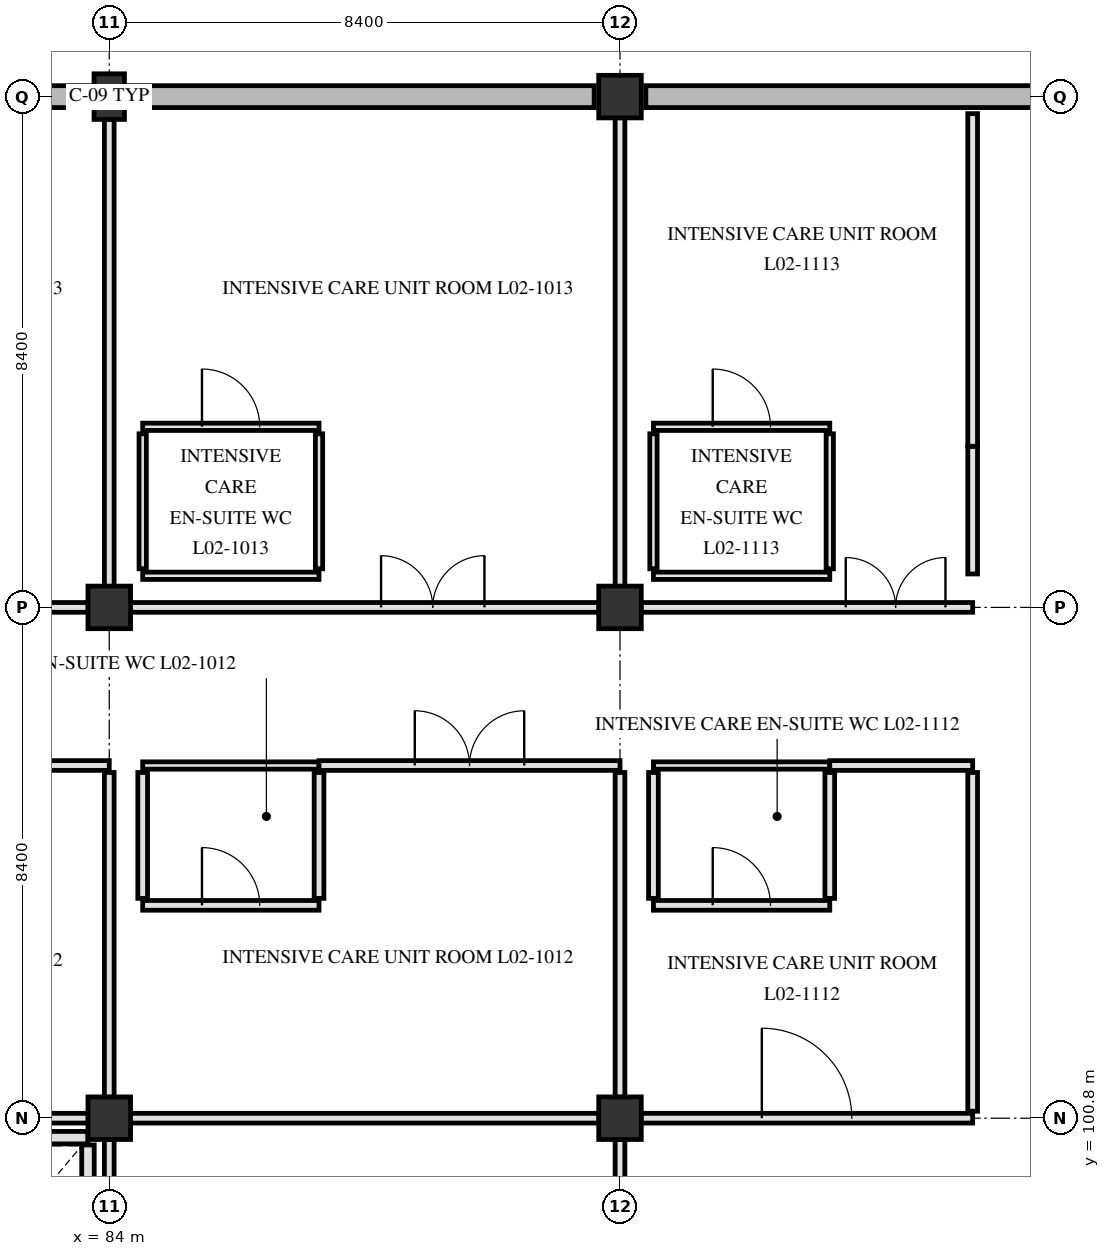
"""IFC4 building model, lengths in metres.
Left out: names, types, materials, properties, quantities, classifications, styles, units other than length and angle.
Written with IfcOpenShell. Run it as: python <this file> out.ifc"""

import sys

from ifc_helpers import new_model, si_unit, direction, frame, frame_2d, origin, origin_2d, place, context, subcontext, project, spatial, rectangle, extrude, element, fill, save


model = new_model("IFC4")
c1 = context("Model", 3, precision=1e-05, world=origin(), true_north=direction((0.0, 1.0)))
c2 = subcontext(c1, "Body", "Model", "MODEL_VIEW")
j1 = project(units=[si_unit("LENGTHUNIT", "METRE"), si_unit("PLANEANGLEUNIT", "RADIAN")], contexts=[c1])
p1 = place(None, origin())
s1 = spatial("IfcSite", under=j1, at=p1, CompositionType="ELEMENT")
p2 = place(p1, origin())
s2 = spatial("IfcBuilding", under=s1, at=p2, CompositionType="ELEMENT")
p3 = place(p2, frame((0.0, 0.0, 9.3)))
s3 = spatial("IfcBuildingStorey", under=s2, at=p3, CompositionType="ELEMENT", Elevation=9.3)
for number, where, z_axis, x_axis in (
    (1, (84.0, 100.8, 0.0), (0.0, 0.0, 1.0), (1.0, 0.0, 0.0)),
    (2, (84.0, 109.2, 0.0), (0.0, 0.0, 1.0), (1.0, 0.0, 0.0)),
):
    element("IfcColumn", number, at=place(p3, frame(where, z_axis=z_axis, x_axis=x_axis)), inside=s3, PredefinedType="COLUMN", context=c2, shape_type="SweptSolid", body=[
        extrude(rectangle(XDim=0.7, YDim=0.7, at=origin_2d()), origin(), (0.0, 0.0, 1.0), 5.1),
    ])
p4 = place(p3, frame((84.0, 117.6, 0.0), z_axis=(0.0, 0.0, 1.0), x_axis=(1.0, 0.0, 0.0)))
e3 = element("IfcColumn", 3, at=p4, inside=s3, PredefinedType="PILASTER", context=c2, shape_type="SweptSolid", body=[
    extrude(rectangle(XDim=0.5, YDim=0.75, at=origin_2d()), origin(), (0.0, 0.0, 1.0), 5.1),
])
for number, where, z_axis, x_axis in (
    (4, (92.4, 100.8, 0.0), (0.0, 0.0, 1.0), (1.0, 0.0, 0.0)),
    (5, (92.4, 109.2, 0.0), (0.0, 0.0, 1.0), (1.0, 0.0, 0.0)),
    (6, (92.4, 117.6, 0.0), (0.0, 0.0, 1.0), (1.0, 0.0, 0.0)),
):
    element("IfcColumn", number, at=place(p3, frame(where, z_axis=z_axis, x_axis=x_axis)), inside=s3, PredefinedType="COLUMN", context=c2, shape_type="SweptSolid", body=[
        extrude(rectangle(XDim=0.7, YDim=0.7, at=origin_2d()), origin(), (0.0, 0.0, 1.0), 5.1),
    ])
for number, where, z_axis, x_axis in (
    (7, (76.025, 117.6, 0.0), (0.0, 0.0, 1.0), (1.0, 0.0, 0.0)),
    (8, (84.325, 117.6, 0.0), (0.0, 0.0, 1.0), (1.0, 0.0, 0.0)),
):
    element("IfcWall", number, at=place(p3, frame(where, z_axis=z_axis, x_axis=x_axis)), inside=s3, PredefinedType="SOLIDWALL", context=c2, shape_type="SweptSolid", body=[
        extrude(rectangle(XDim=7.65, YDim=0.36, at=frame_2d((3.825, 0.0))), origin(), (0.0, 0.0, 1.0), 4.78),
    ])
p5 = place(p3, frame((92.825, 117.6, 0.0), z_axis=(0.0, 0.0, 1.0), x_axis=(1.0, 0.0, 0.0)))
e9 = element("IfcWall", 9, at=p5, inside=s3, PredefinedType="SOLIDWALL", context=c2, shape_type="SweptSolid", body=[
    extrude(rectangle(XDim=7.55, YDim=0.36, at=frame_2d((3.775, 0.0))), origin(), (0.0, 0.0, 1.0), 4.78),
])
p6 = place(p3, frame((83.65, 96.24, 0.0), z_axis=(0.0, 0.0, 1.0), x_axis=(0.0, 1.0, 0.0)))
e10 = element("IfcWall", 10, at=p6, inside=s3, PredefinedType="PARTITIONING", context=c2, shape_type="SweptSolid", body=[
    extrude(rectangle(XDim=4.12, YDim=0.205, at=frame_2d((2.06, 0.0))), origin(), (0.0, 0.0, 1.0), 4.77),
])
p7 = place(p3, frame((80.08, 100.48, 0.0), z_axis=(0.0, 0.0, 1.0), x_axis=(1.0, 0.0, 0.0)))
e11 = element("IfcWall", 11, at=p7, inside=s3, PredefinedType="PARTITIONING", context=c2, shape_type="SweptSolid", body=[
    extrude(rectangle(XDim=3.57, YDim=0.205, at=frame_2d((1.785, 0.0))), origin(), (0.0, 0.0, 1.0), 4.17),
])
p8 = place(p3, frame((78.95, 100.8, 0.0), z_axis=(0.0, 0.0, 1.0), x_axis=(1.0, 0.0, 0.0)))
e12 = element("IfcWall", 12, at=p8, inside=s3, PredefinedType="PARTITIONING", context=c2, shape_type="SweptSolid", body=[
    extrude(rectangle(XDim=4.705, YDim=0.16, at=frame_2d((2.353, 0.0))), origin(), (0.0, 0.0, 1.0), 4.17),
])
p9 = place(p3, frame((84.345, 100.8, 0.0), z_axis=(0.0, 0.0, 1.0), x_axis=(1.0, 0.0, 0.0)))
e13 = element("IfcWall", 13, at=p9, inside=s3, PredefinedType="PARTITIONING", context=c2, shape_type="SweptSolid", body=[
    extrude(rectangle(XDim=7.71, YDim=0.16, at=frame_2d((3.855, 0.0))), origin(), (0.0, 0.0, 1.0), 4.17),
])
p10 = place(p3, frame((92.745, 100.8, 0.0), z_axis=(0.0, 0.0, 1.0), x_axis=(1.0, 0.0, 0.0)))
e14 = element("IfcWall", 14, at=p10, inside=s3, PredefinedType="PARTITIONING", context=c2, shape_type="SweptSolid", body=[
    extrude(rectangle(XDim=5.455, YDim=0.16, at=frame_2d((2.728, 0.0))), origin(), (0.0, 0.0, 1.0), 4.17),
])
p11 = place(p10, frame((1.988, 0.0, 0.0)))
e15 = element("IfcOpeningElement", 15, at=p11, cuts=e14, PredefinedType="OPENING", context=c2, shape_type="SweptSolid", body=[
    extrude(rectangle(XDim=1.48, YDim=2.22, at=frame_2d((0.74, 1.11))), frame((0.0, 0.09, 0.0), z_axis=(0.0, -1.0, 0.0), x_axis=(1.0, 0.0, 0.0)), (0.0, 0.0, 1.0), 0.18),
])
p12 = place(p3, frame((84.55, 104.3, 0.0), z_axis=(0.0, 0.0, 1.0), x_axis=(1.0, 0.0, 0.0)))
e16 = element("IfcWall", 16, at=p12, inside=s3, PredefinedType="PARTITIONING", context=c2, shape_type="SweptSolid", body=[
    extrude(rectangle(XDim=2.9, YDim=0.16, at=frame_2d((1.45, 0.0))), origin(), (0.0, 0.0, 1.0), 4.77),
])
p13 = place(p12, frame((0.975, 0.0, 0.0)))
e17 = element("IfcOpeningElement", 17, at=p13, cuts=e16, PredefinedType="OPENING", context=c2, shape_type="SweptSolid", body=[
    extrude(rectangle(XDim=0.95, YDim=2.1, at=frame_2d((0.475, 1.05))), frame((0.0, 0.09, 0.0), z_axis=(0.0, -1.0, 0.0), x_axis=(1.0, 0.0, 0.0)), (0.0, 0.0, 1.0), 0.18),
])
p14 = place(p3, frame((92.95, 104.3, 0.0), z_axis=(0.0, 0.0, 1.0), x_axis=(1.0, 0.0, 0.0)))
e18 = element("IfcWall", 18, at=p14, inside=s3, PredefinedType="PARTITIONING", context=c2, shape_type="SweptSolid", body=[
    extrude(rectangle(XDim=2.9, YDim=0.16, at=frame_2d((1.45, 0.0))), origin(), (0.0, 0.0, 1.0), 4.77),
])
p15 = place(p14, frame((0.975, 0.0, 0.0)))
e19 = element("IfcOpeningElement", 19, at=p15, cuts=e18, PredefinedType="OPENING", context=c2, shape_type="SweptSolid", body=[
    extrude(rectangle(XDim=0.95, YDim=2.1, at=frame_2d((0.475, 1.05))), frame((0.0, 0.09, 0.0), z_axis=(0.0, -1.0, 0.0), x_axis=(1.0, 0.0, 0.0)), (0.0, 0.0, 1.0), 0.18),
])
p16 = place(p3, frame((79.05, 106.6, 0.0), z_axis=(0.0, 0.0, 1.0), x_axis=(1.0, 0.0, 0.0)))
e20 = element("IfcWall", 20, at=p16, inside=s3, PredefinedType="PARTITIONING", context=c2, shape_type="SweptSolid", body=[
    extrude(rectangle(XDim=4.95, YDim=0.16, at=frame_2d((2.475, 0.0))), origin(), (0.0, 0.0, 1.0), 4.17),
])
p17 = place(p16, frame((1.985, 0.0, 0.0)))
e21 = element("IfcOpeningElement", 21, at=p17, cuts=e20, PredefinedType="OPENING", context=c2, shape_type="SweptSolid", body=[
    extrude(rectangle(XDim=0.98, YDim=2.12, at=frame_2d((0.49, 1.06))), frame((0.0, 0.09, 0.0), z_axis=(0.0, -1.0, 0.0), x_axis=(1.0, 0.0, 0.0)), (0.0, 0.0, 1.0), 0.18),
])
p18 = place(p3, frame((84.55, 106.6, 0.0), z_axis=(0.0, 0.0, 1.0), x_axis=(1.0, 0.0, 0.0)))
e22 = element("IfcWall", 22, at=p18, inside=s3, PredefinedType="PARTITIONING", context=c2, shape_type="SweptSolid", body=[
    extrude(rectangle(XDim=2.9, YDim=0.12, at=frame_2d((1.45, 0.0))), origin(), (0.0, 0.0, 1.0), 4.77),
])
p19 = place(p3, frame((87.45, 106.6, 0.0), z_axis=(0.0, 0.0, 1.0), x_axis=(1.0, 0.0, 0.0)))
e23 = element("IfcWall", 23, at=p19, inside=s3, PredefinedType="PARTITIONING", context=c2, shape_type="SweptSolid", body=[
    extrude(rectangle(XDim=4.95, YDim=0.16, at=frame_2d((2.475, 0.0))), origin(), (0.0, 0.0, 1.0), 4.17),
])
p20 = place(p19, frame((1.575, 0.0, 0.0)))
e24 = element("IfcOpeningElement", 24, at=p20, cuts=e23, PredefinedType="OPENING", context=c2, shape_type="SweptSolid", body=[
    extrude(rectangle(XDim=1.8, YDim=2.25, at=frame_2d((0.9, 1.125))), frame((0.0, 0.09, 0.0), z_axis=(0.0, -1.0, 0.0), x_axis=(1.0, 0.0, 0.0)), (0.0, 0.0, 1.0), 0.18),
])
p21 = place(p3, frame((92.95, 106.6, 0.0), z_axis=(0.0, 0.0, 1.0), x_axis=(1.0, 0.0, 0.0)))
e25 = element("IfcWall", 25, at=p21, inside=s3, PredefinedType="PARTITIONING", context=c2, shape_type="SweptSolid", body=[
    extrude(rectangle(XDim=2.9, YDim=0.12, at=frame_2d((1.45, 0.0))), origin(), (0.0, 0.0, 1.0), 4.77),
])
p22 = place(p3, frame((95.85, 106.6, 0.0), z_axis=(0.0, 0.0, 1.0), x_axis=(1.0, 0.0, 0.0)))
e26 = element("IfcWall", 26, at=p22, inside=s3, PredefinedType="PARTITIONING", context=c2, shape_type="SweptSolid", body=[
    extrude(rectangle(XDim=2.35, YDim=0.16, at=frame_2d((1.175, 0.0))), origin(), (0.0, 0.0, 1.0), 4.77),
])
p23 = place(p3, frame((75.945, 109.2, 0.0), z_axis=(0.0, 0.0, 1.0), x_axis=(1.0, 0.0, 0.0)))
e27 = element("IfcWall", 27, at=p23, inside=s3, PredefinedType="PARTITIONING", context=c2, shape_type="SweptSolid", body=[
    extrude(rectangle(XDim=7.71, YDim=0.16, at=frame_2d((3.855, 0.0))), origin(), (0.0, 0.0, 1.0), 4.17),
])
p24 = place(p23, frame((3.265, 0.0, 0.0)))
e28 = element("IfcOpeningElement", 28, at=p24, cuts=e27, PredefinedType="OPENING", context=c2, shape_type="SweptSolid", body=[
    extrude(rectangle(XDim=1.18, YDim=2.18, at=frame_2d((0.59, 1.09))), frame((0.0, 0.09, 0.0), z_axis=(0.0, -1.0, 0.0), x_axis=(1.0, 0.0, 0.0)), (0.0, 0.0, 1.0), 0.18),
])
p25 = place(p3, frame((84.345, 109.2, 0.0), z_axis=(0.0, 0.0, 1.0), x_axis=(1.0, 0.0, 0.0)))
e29 = element("IfcWall", 29, at=p25, inside=s3, PredefinedType="PARTITIONING", context=c2, shape_type="SweptSolid", body=[
    extrude(rectangle(XDim=7.71, YDim=0.16, at=frame_2d((3.855, 0.0))), origin(), (0.0, 0.0, 1.0), 4.17),
])
p26 = place(p25, frame((4.125, 0.0, 0.0)))
e30 = element("IfcOpeningElement", 30, at=p26, cuts=e29, PredefinedType="OPENING", context=c2, shape_type="SweptSolid", body=[
    extrude(rectangle(XDim=1.7, YDim=2.25, at=frame_2d((0.85, 1.125))), frame((0.0, 0.09, 0.0), z_axis=(0.0, -1.0, 0.0), x_axis=(1.0, 0.0, 0.0)), (0.0, 0.0, 1.0), 0.18),
])
p27 = place(p3, frame((92.745, 109.2, 0.0), z_axis=(0.0, 0.0, 1.0), x_axis=(1.0, 0.0, 0.0)))
e31 = element("IfcWall", 31, at=p27, inside=s3, PredefinedType="PARTITIONING", context=c2, shape_type="SweptSolid", body=[
    extrude(rectangle(XDim=5.455, YDim=0.16, at=frame_2d((2.728, 0.0))), origin(), (0.0, 0.0, 1.0), 4.17),
])
p28 = place(p27, frame((3.368, 0.0, 0.0)))
e32 = element("IfcOpeningElement", 32, at=p28, cuts=e31, PredefinedType="OPENING", context=c2, shape_type="SweptSolid", body=[
    extrude(rectangle(XDim=1.64, YDim=2.28, at=frame_2d((0.82, 1.14))), frame((0.0, 0.09, 0.0), z_axis=(0.0, -1.0, 0.0), x_axis=(1.0, 0.0, 0.0)), (0.0, 0.0, 1.0), 0.18),
])
p29 = place(p3, frame((84.55, 109.72, 0.0), z_axis=(0.0, 0.0, 1.0), x_axis=(1.0, 0.0, 0.0)))
e33 = element("IfcWall", 33, at=p29, inside=s3, PredefinedType="PARTITIONING", context=c2, shape_type="SweptSolid", body=[
    extrude(rectangle(XDim=2.9, YDim=0.12, at=frame_2d((1.45, 0.0))), origin(), (0.0, 0.0, 1.0), 4.77),
])
p30 = place(p3, frame((92.95, 109.72, 0.0), z_axis=(0.0, 0.0, 1.0), x_axis=(1.0, 0.0, 0.0)))
e34 = element("IfcWall", 34, at=p30, inside=s3, PredefinedType="PARTITIONING", context=c2, shape_type="SweptSolid", body=[
    extrude(rectangle(XDim=2.9, YDim=0.12, at=frame_2d((1.45, 0.0))), origin(), (0.0, 0.0, 1.0), 4.77),
])
p31 = place(p3, frame((84.55, 112.17, 0.0), z_axis=(0.0, 0.0, 1.0), x_axis=(1.0, 0.0, 0.0)))
e35 = element("IfcWall", 35, at=p31, inside=s3, PredefinedType="PARTITIONING", context=c2, shape_type="SweptSolid", body=[
    extrude(rectangle(XDim=2.9, YDim=0.12, at=frame_2d((1.45, 0.0))), origin(), (0.0, 0.0, 1.0), 4.77),
])
p32 = place(p31, frame((0.975, 0.0, 0.0)))
e36 = element("IfcOpeningElement", 36, at=p32, cuts=e35, PredefinedType="OPENING", context=c2, shape_type="SweptSolid", body=[
    extrude(rectangle(XDim=0.95, YDim=2.1, at=frame_2d((0.475, 1.05))), frame((0.0, 0.07, 0.0), z_axis=(0.0, -1.0, 0.0), x_axis=(1.0, 0.0, 0.0)), (0.0, 0.0, 1.0), 0.14),
])
p33 = place(p3, frame((92.95, 112.17, 0.0), z_axis=(0.0, 0.0, 1.0), x_axis=(1.0, 0.0, 0.0)))
e37 = element("IfcWall", 37, at=p33, inside=s3, PredefinedType="PARTITIONING", context=c2, shape_type="SweptSolid", body=[
    extrude(rectangle(XDim=2.9, YDim=0.12, at=frame_2d((1.45, 0.0))), origin(), (0.0, 0.0, 1.0), 4.77),
])
p34 = place(p33, frame((0.975, 0.0, 0.0)))
e38 = element("IfcOpeningElement", 38, at=p34, cuts=e37, PredefinedType="OPENING", context=c2, shape_type="SweptSolid", body=[
    extrude(rectangle(XDim=0.95, YDim=2.1, at=frame_2d((0.475, 1.05))), frame((0.0, 0.07, 0.0), z_axis=(0.0, -1.0, 0.0), x_axis=(1.0, 0.0, 0.0)), (0.0, 0.0, 1.0), 0.14),
])
p35 = place(p3, frame((84.0, 96.1, 0.0), z_axis=(0.0, 0.0, 1.0), x_axis=(0.0, 1.0, 0.0)))
e39 = element("IfcWall", 39, at=p35, inside=s3, PredefinedType="PARTITIONING", context=c2, shape_type="SweptSolid", body=[
    extrude(rectangle(XDim=4.355, YDim=0.16, at=frame_2d((2.177, 0.0))), origin(), (0.0, 0.0, 1.0), 4.17),
])
p36 = place(p3, frame((84.0, 101.145, 0.0), z_axis=(0.0, 0.0, 1.0), x_axis=(0.0, 1.0, 0.0)))
e40 = element("IfcWall", 40, at=p36, inside=s3, PredefinedType="PARTITIONING", context=c2, shape_type="SweptSolid", body=[
    extrude(rectangle(XDim=5.34, YDim=0.16, at=frame_2d((2.67, 0.0))), origin(), (0.0, 0.0, 1.0), 4.17),
])
p37 = place(p3, frame((84.0, 109.545, 0.0), z_axis=(0.0, 0.0, 1.0), x_axis=(0.0, 1.0, 0.0)))
e41 = element("IfcWall", 41, at=p37, inside=s3, PredefinedType="PARTITIONING", context=c2, shape_type="SweptSolid", body=[
    extrude(rectangle(XDim=7.685, YDim=0.16, at=frame_2d((3.843, 0.0))), origin(), (0.0, 0.0, 1.0), 4.17),
])
p38 = place(p3, frame((84.55, 104.415, 0.0), z_axis=(0.0, 0.0, 1.0), x_axis=(0.0, 1.0, 0.0)))
e42 = element("IfcWall", 42, at=p38, inside=s3, PredefinedType="PARTITIONING", context=c2, shape_type="SweptSolid", body=[
    extrude(rectangle(XDim=2.07, YDim=0.16, at=frame_2d((1.035, 0.0))), origin(), (0.0, 0.0, 1.0), 4.77),
])
p39 = place(p3, frame((84.55, 109.835, 0.0), z_axis=(0.0, 0.0, 1.0), x_axis=(0.0, 1.0, 0.0)))
e43 = element("IfcWall", 43, at=p39, inside=s3, PredefinedType="PARTITIONING", context=c2, shape_type="SweptSolid", body=[
    extrude(rectangle(XDim=2.22, YDim=0.12, at=frame_2d((1.11, 0.0))), origin(), (0.0, 0.0, 1.0), 4.77),
])
p40 = place(p3, frame((87.45, 104.415, 0.0), z_axis=(0.0, 0.0, 1.0), x_axis=(0.0, 1.0, 0.0)))
e44 = element("IfcWall", 44, at=p40, inside=s3, PredefinedType="PARTITIONING", context=c2, shape_type="SweptSolid", body=[
    extrude(rectangle(XDim=2.07, YDim=0.16, at=frame_2d((1.035, 0.0))), origin(), (0.0, 0.0, 1.0), 4.77),
])
p41 = place(p3, frame((87.45, 109.835, 0.0), z_axis=(0.0, 0.0, 1.0), x_axis=(0.0, 1.0, 0.0)))
e45 = element("IfcWall", 45, at=p41, inside=s3, PredefinedType="PARTITIONING", context=c2, shape_type="SweptSolid", body=[
    extrude(rectangle(XDim=2.22, YDim=0.12, at=frame_2d((1.11, 0.0))), origin(), (0.0, 0.0, 1.0), 4.77),
])
for number, where, z_axis, x_axis in (
    (46, (92.4, 95.115, 0.0), (0.0, 0.0, 1.0), (0.0, 1.0, 0.0)),
    (47, (92.4, 101.145, 0.0), (0.0, 0.0, 1.0), (0.0, 1.0, 0.0)),
):
    element("IfcWall", number, at=place(p3, frame(where, z_axis=z_axis, x_axis=x_axis)), inside=s3, PredefinedType="PARTITIONING", context=c2, shape_type="SweptSolid", body=[
        extrude(rectangle(XDim=5.34, YDim=0.16, at=frame_2d((2.67, 0.0))), origin(), (0.0, 0.0, 1.0), 4.17),
    ])
p42 = place(p3, frame((92.4, 109.545, 0.0), z_axis=(0.0, 0.0, 1.0), x_axis=(0.0, 1.0, 0.0)))
e48 = element("IfcWall", 48, at=p42, inside=s3, PredefinedType="PARTITIONING", context=c2, shape_type="SweptSolid", body=[
    extrude(rectangle(XDim=7.71, YDim=0.16, at=frame_2d((3.855, 0.0))), origin(), (0.0, 0.0, 1.0), 4.17),
])
p43 = place(p3, frame((92.95, 104.415, 0.0), z_axis=(0.0, 0.0, 1.0), x_axis=(0.0, 1.0, 0.0)))
e49 = element("IfcWall", 49, at=p43, inside=s3, PredefinedType="PARTITIONING", context=c2, shape_type="SweptSolid", body=[
    extrude(rectangle(XDim=2.07, YDim=0.16, at=frame_2d((1.035, 0.0))), origin(), (0.0, 0.0, 1.0), 4.77),
])
p44 = place(p3, frame((92.95, 109.835, 0.0), z_axis=(0.0, 0.0, 1.0), x_axis=(0.0, 1.0, 0.0)))
e50 = element("IfcWall", 50, at=p44, inside=s3, PredefinedType="PARTITIONING", context=c2, shape_type="SweptSolid", body=[
    extrude(rectangle(XDim=2.22, YDim=0.12, at=frame_2d((1.11, 0.0))), origin(), (0.0, 0.0, 1.0), 4.77),
])
p45 = place(p3, frame((95.85, 104.415, 0.0), z_axis=(0.0, 0.0, 1.0), x_axis=(0.0, 1.0, 0.0)))
e51 = element("IfcWall", 51, at=p45, inside=s3, PredefinedType="PARTITIONING", context=c2, shape_type="SweptSolid", body=[
    extrude(rectangle(XDim=2.07, YDim=0.16, at=frame_2d((1.035, 0.0))), origin(), (0.0, 0.0, 1.0), 4.77),
])
p46 = place(p3, frame((95.85, 109.835, 0.0), z_axis=(0.0, 0.0, 1.0), x_axis=(0.0, 1.0, 0.0)))
e52 = element("IfcWall", 52, at=p46, inside=s3, PredefinedType="PARTITIONING", context=c2, shape_type="SweptSolid", body=[
    extrude(rectangle(XDim=2.22, YDim=0.12, at=frame_2d((1.11, 0.0))), origin(), (0.0, 0.0, 1.0), 4.77),
])
p47 = place(p3, frame((98.2, 100.915, 0.0), z_axis=(0.0, 0.0, 1.0), x_axis=(0.0, 1.0, 0.0)))
e53 = element("IfcWall", 53, at=p47, inside=s3, PredefinedType="PARTITIONING", context=c2, shape_type="SweptSolid", body=[
    extrude(rectangle(XDim=5.57, YDim=0.16, at=frame_2d((2.785, 0.0))), origin(), (0.0, 0.0, 1.0), 4.17),
])
p48 = place(p3, frame((98.2, 109.75, 0.0), z_axis=(0.0, 0.0, 1.0), x_axis=(0.0, 1.0, 0.0)))
e54 = element("IfcWall", 54, at=p48, inside=s3, PredefinedType="PARTITIONING", context=c2, shape_type="SweptSolid", body=[
    extrude(rectangle(XDim=2.1, YDim=0.16, at=frame_2d((1.05, 0.0))), origin(), (0.0, 0.0, 1.0), 4.77),
])
p49 = place(p3, frame((98.2, 111.85, 0.0), z_axis=(0.0, 0.0, 1.0), x_axis=(0.0, 1.0, 0.0)))
e55 = element("IfcWall", 55, at=p49, inside=s3, PredefinedType="PARTITIONING", context=c2, shape_type="SweptSolid", body=[
    extrude(rectangle(XDim=5.47, YDim=0.16, at=frame_2d((2.735, 0.0))), origin(), (0.0, 0.0, 1.0), 4.77),
])
p50 = place(p20, origin())
e56 = element("IfcDoor", 56, at=p50, inside=s3, OperationType="DOUBLE_SWING_RIGHT", PredefinedType="DOOR", context=c2, shape_type="SweptSolid", body=[
    extrude(rectangle(XDim=1.8, YDim=2.25, at=frame_2d((0.9, 1.125))), frame((0.0, 0.025, 0.0), z_axis=(0.0, -1.0, 0.0), x_axis=(1.0, 0.0, 0.0)), (0.0, 0.0, 1.0), 0.05),
])
fill(e24, e56)
p51 = place(p13, origin())
e57 = element("IfcDoor", 57, at=p51, inside=s3, OperationType="SINGLE_SWING_LEFT", PredefinedType="DOOR", context=c2, shape_type="SweptSolid", body=[
    extrude(rectangle(XDim=0.95, YDim=2.1, at=frame_2d((0.475, 1.05))), frame((0.0, 0.025, 0.0), z_axis=(0.0, -1.0, 0.0), x_axis=(1.0, 0.0, 0.0)), (0.0, 0.0, 1.0), 0.05),
])
fill(e17, e57)
p52 = place(p26, origin())
e58 = element("IfcDoor", 58, at=p52, inside=s3, OperationType="DOUBLE_SWING_RIGHT", PredefinedType="DOOR", context=c2, shape_type="SweptSolid", body=[
    extrude(rectangle(XDim=1.7, YDim=2.25, at=frame_2d((0.85, 1.125))), frame((0.0, 0.025, 0.0), z_axis=(0.0, -1.0, 0.0), x_axis=(1.0, 0.0, 0.0)), (0.0, 0.0, 1.0), 0.05),
])
fill(e30, e58)
p53 = place(p32, origin())
e59 = element("IfcDoor", 59, at=p53, inside=s3, OperationType="SINGLE_SWING_LEFT", PredefinedType="DOOR", context=c2, shape_type="SweptSolid", body=[
    extrude(rectangle(XDim=0.95, YDim=2.1, at=frame_2d((0.475, 1.05))), frame((0.0, 0.025, 0.0), z_axis=(0.0, -1.0, 0.0), x_axis=(1.0, 0.0, 0.0)), (0.0, 0.0, 1.0), 0.05),
])
fill(e36, e59)
p54 = place(p11, origin())
e60 = element("IfcDoor", 60, at=p54, inside=s3, OperationType="SINGLE_SWING_LEFT", PredefinedType="DOOR", context=c2, shape_type="SweptSolid", body=[
    extrude(rectangle(XDim=1.48, YDim=2.22, at=frame_2d((0.74, 1.11))), frame((0.0, 0.025, 0.0), z_axis=(0.0, -1.0, 0.0), x_axis=(1.0, 0.0, 0.0)), (0.0, 0.0, 1.0), 0.05),
])
fill(e15, e60)
p55 = place(p15, origin())
e61 = element("IfcDoor", 61, at=p55, inside=s3, OperationType="SINGLE_SWING_LEFT", PredefinedType="DOOR", context=c2, shape_type="SweptSolid", body=[
    extrude(rectangle(XDim=0.95, YDim=2.1, at=frame_2d((0.475, 1.05))), frame((0.0, 0.025, 0.0), z_axis=(0.0, -1.0, 0.0), x_axis=(1.0, 0.0, 0.0)), (0.0, 0.0, 1.0), 0.05),
])
fill(e19, e61)
p56 = place(p28, origin())
e62 = element("IfcDoor", 62, at=p56, inside=s3, OperationType="DOUBLE_SWING_LEFT", PredefinedType="DOOR", context=c2, shape_type="SweptSolid", body=[
    extrude(rectangle(XDim=1.64, YDim=2.28, at=frame_2d((0.82, 1.14))), frame((0.0, 0.025, 0.0), z_axis=(0.0, -1.0, 0.0), x_axis=(1.0, 0.0, 0.0)), (0.0, 0.0, 1.0), 0.05),
])
fill(e32, e62)
p57 = place(p34, origin())
e63 = element("IfcDoor", 63, at=p57, inside=s3, OperationType="SINGLE_SWING_LEFT", PredefinedType="DOOR", context=c2, shape_type="SweptSolid", body=[
    extrude(rectangle(XDim=0.95, YDim=2.1, at=frame_2d((0.475, 1.05))), frame((0.0, 0.025, 0.0), z_axis=(0.0, -1.0, 0.0), x_axis=(1.0, 0.0, 0.0)), (0.0, 0.0, 1.0), 0.05),
])
fill(e38, e63)
save(model, sys.argv[1])
